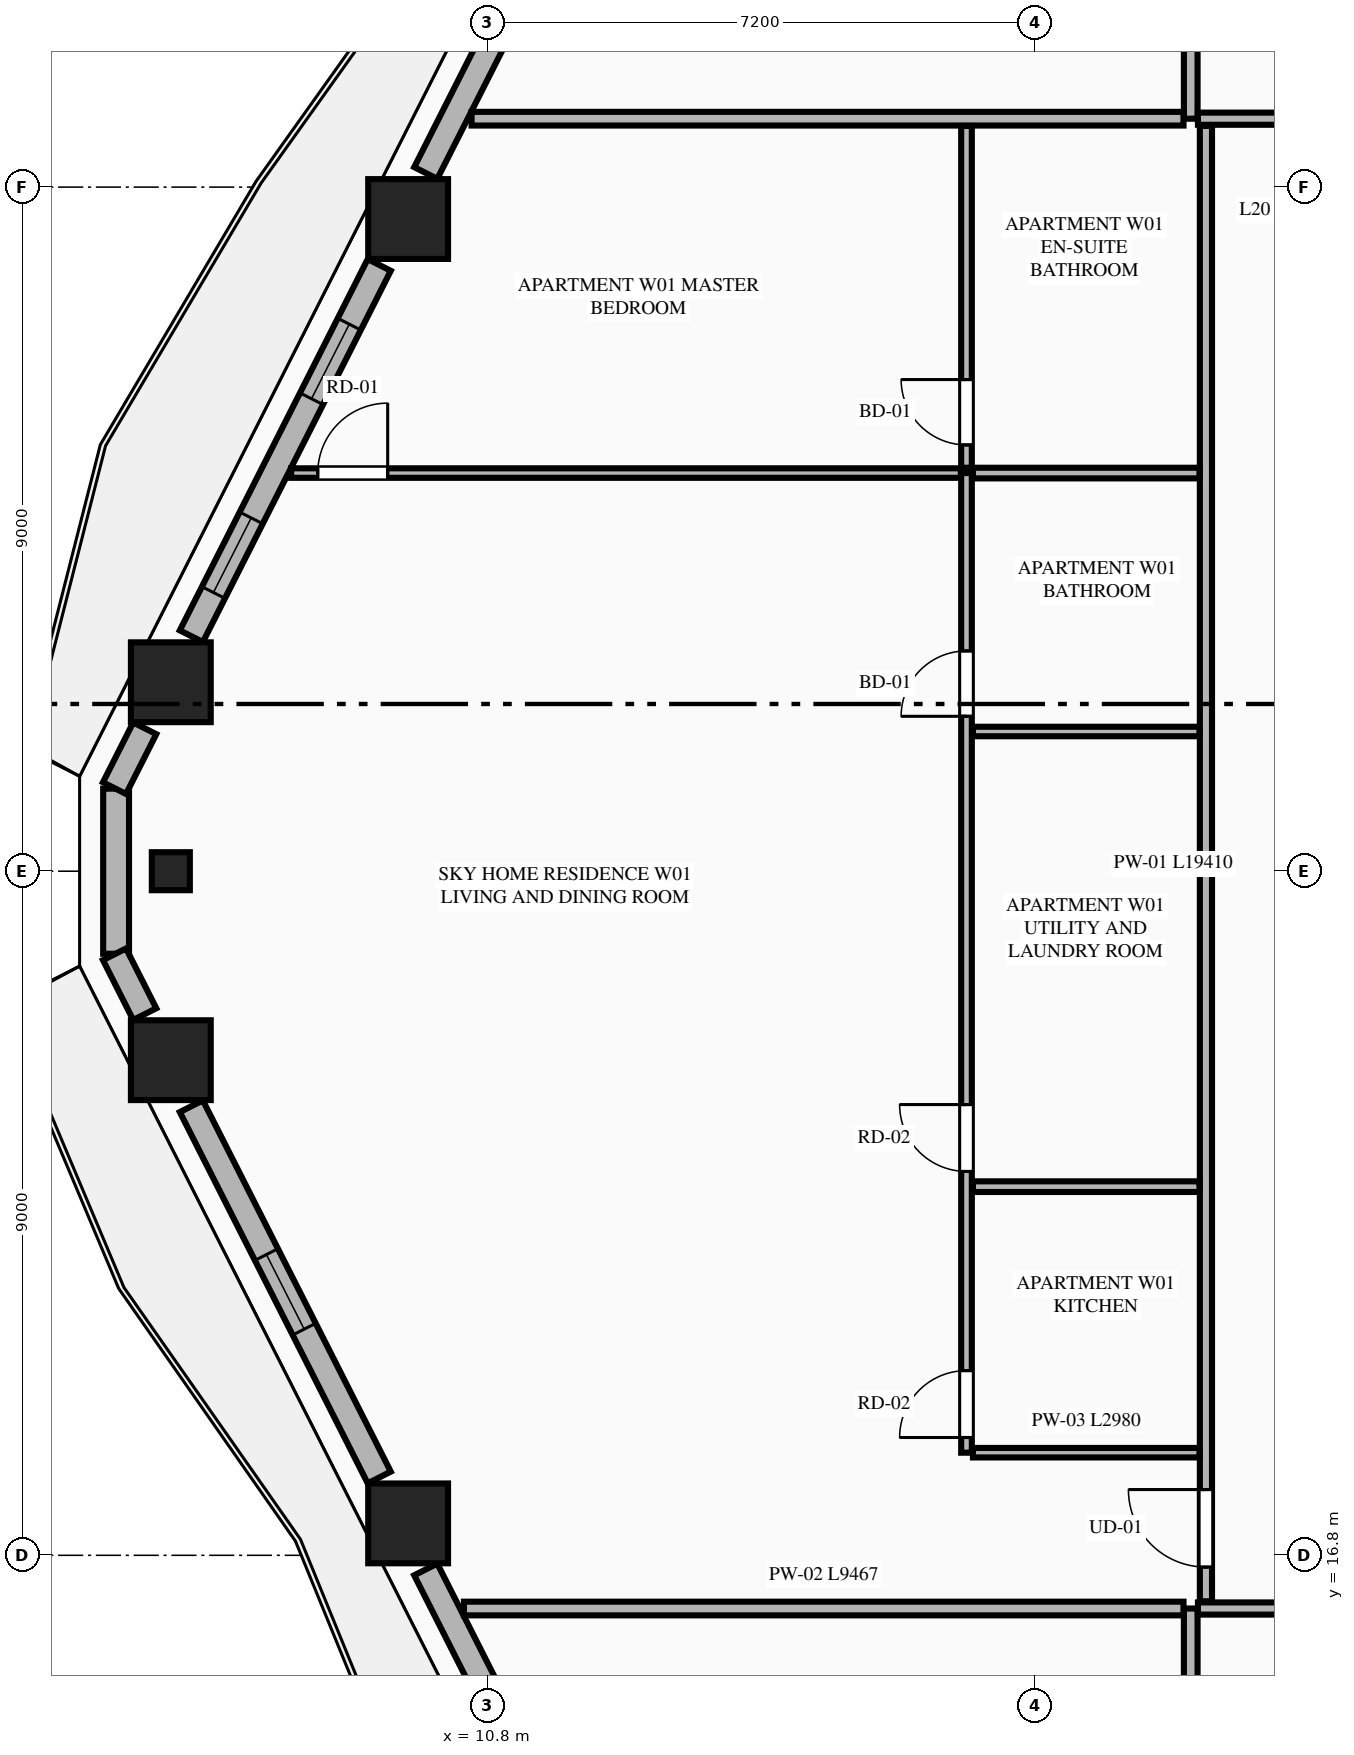
"""IFC4 building model, lengths in metres.
Left out: names, types, materials, properties, quantities, classifications, styles, units other than length and angle.
Written with IfcOpenShell. Run it as: python <this file> out.ifc"""

import sys

from ifc_helpers import new_model, si_unit, direction, frame, frame_2d, origin, origin_2d, place, context, subcontext, project, spatial, rectangle, extrude, element, fill, save


model = new_model("IFC4")
c1 = context("Model", 3, precision=1e-05, world=origin(), true_north=direction((0.0, 1.0)))
c2 = subcontext(c1, "Body", "Model", "MODEL_VIEW")
j1 = project(units=[si_unit("LENGTHUNIT", "METRE"), si_unit("PLANEANGLEUNIT", "RADIAN")], contexts=[c1])
p1 = place(None, origin())
s1 = spatial("IfcSite", under=j1, at=p1, CompositionType="ELEMENT")
p2 = place(p1, origin())
s2 = spatial("IfcBuilding", under=s1, at=p2, CompositionType="ELEMENT")
p3 = place(p2, frame((0.0, 0.0, 80.0)))
s3 = spatial("IfcBuildingStorey", under=s2, at=p3, CompositionType="ELEMENT", Elevation=80.0)
for number, where, z_axis, x_axis in (
    (1, (9.754, 34.38, 0.0), (0.0, 0.0, 1.0), (1.0, 0.0, 0.0)),
    (2, (6.632, 28.286, 0.0), (0.0, 0.0, 1.0), (1.0, 0.0, 0.0)),
    (3, (6.632, 23.314, 0.0), (0.0, 0.0, 1.0), (1.0, 0.0, 0.0)),
    (4, (9.754, 17.22, 0.0), (0.0, 0.0, 1.0), (1.0, 0.0, 0.0)),
):
    element("IfcColumn", number, at=place(p3, frame(where, z_axis=z_axis, x_axis=x_axis)), inside=s3, PredefinedType="COLUMN", context=c2, shape_type="SweptSolid", body=[
        extrude(rectangle(XDim=1.05, YDim=1.05, at=origin_2d()), origin(), (0.0, 0.0, 1.0), 3.55),
    ])
p4 = place(p3, frame((6.632, 25.8, 0.0), z_axis=(0.0, 0.0, 1.0), x_axis=(0.0, -1.0, 0.0)))
e5 = element("IfcColumn", 5, at=p4, inside=s3, PredefinedType="PILASTER", context=c2, shape_type="SweptSolid", body=[
    extrude(rectangle(XDim=0.5, YDim=0.35, at=origin_2d()), origin(), (0.0, 0.0, 1.0), 3.55),
])
p5 = place(p3, frame((5.912, 26.886, 0.0), z_axis=(0.0, 0.0, 1.0), x_axis=(0.0, -1.0, 0.0)))
e6 = element("IfcWall", 6, at=p5, inside=s3, PredefinedType="STANDARD", context=c2, shape_type="SweptSolid", body=[
    extrude(rectangle(XDim=2.172, YDim=0.34, at=frame_2d((1.086, 0.0))), origin(), (0.0, 0.0, 1.0), 3.33),
])
p6 = place(p3, frame((12.567, 40.085, 0.0), z_axis=(0.0, 0.0, 1.0), x_axis=(-0.451599886425, -0.892220568347, 0.0)))
e7 = element("IfcWall", 7, at=p6, inside=s3, PredefinedType="STANDARD", context=c2, shape_type="SweptSolid", body=[
    extrude(rectangle(XDim=5.715, YDim=0.34, at=frame_2d((2.857, 0.0))), origin(), (0.0, 0.0, 1.0), 2.787),
])
p7 = place(p6, frame((1.782, 0.0, 0.0)))
e8 = element("IfcOpeningElement", 8, at=p7, cuts=e7, PredefinedType="OPENING", context=c2, shape_type="SweptSolid", body=[
    extrude(rectangle(XDim=1.1, YDim=2.25, at=frame_2d((0.55, 1.125))), frame((0.0, 0.18, 0.0), z_axis=(0.0, -1.0, 0.0), x_axis=(1.0, 0.0, 0.0)), (0.0, 0.0, 1.0), 0.36),
])
p8 = place(p3, frame((9.374, 33.776, 0.0), z_axis=(0.0, 0.0, 1.0), x_axis=(-0.451597066012, -0.892221995901, 0.0)))
e9 = element("IfcWall", 9, at=p8, inside=s3, PredefinedType="STANDARD", context=c2, shape_type="SweptSolid", body=[
    extrude(rectangle(XDim=5.474, YDim=0.34, at=frame_2d((2.737, 0.0))), origin(), (0.0, 0.0, 1.0), 2.787),
])
p9 = place(p8, frame((0.873, 0.0, 0.75)))
e10 = element("IfcOpeningElement", 10, at=p9, cuts=e9, PredefinedType="OPENING", context=c2, shape_type="SweptSolid", body=[
    extrude(rectangle(XDim=1.1, YDim=1.887, at=frame_2d((0.55, 0.943))), frame((0.0, 0.18, 0.0), z_axis=(0.0, -1.0, 0.0), x_axis=(1.0, 0.0, 0.0)), (0.0, 0.0, 1.0), 0.36),
])
p10 = place(p8, frame((3.73, 0.0, 0.75)))
e11 = element("IfcOpeningElement", 11, at=p10, cuts=e9, PredefinedType="OPENING", context=c2, shape_type="SweptSolid", body=[
    extrude(rectangle(XDim=1.1, YDim=1.887, at=frame_2d((0.55, 0.943))), frame((0.0, 0.18, 0.0), z_axis=(0.0, -1.0, 0.0), x_axis=(1.0, 0.0, 0.0)), (0.0, 0.0, 1.0), 0.36),
])
p11 = place(p3, frame((6.289, 27.68, 0.0), z_axis=(0.0, 0.0, 1.0), x_axis=(-0.451306655769, -0.892368927327, 0.0)))
e12 = element("IfcWall", 12, at=p11, inside=s3, PredefinedType="STANDARD", context=c2, shape_type="SweptSolid", body=[
    extrude(rectangle(XDim=0.882, YDim=0.34, at=frame_2d((0.441, 0.0))), origin(), (0.0, 0.0, 1.0), 3.33),
])
p12 = place(p3, frame((5.891, 24.707, 0.0), z_axis=(0.0, 0.0, 1.0), x_axis=(0.451195173259, -0.892425299747, 0.0)))
e13 = element("IfcWall", 13, at=p12, inside=s3, PredefinedType="STANDARD", context=c2, shape_type="SweptSolid", body=[
    extrude(rectangle(XDim=0.882, YDim=0.34, at=frame_2d((0.441, 0.0))), origin(), (0.0, 0.0, 1.0), 3.33),
])
p13 = place(p3, frame((6.902, 22.708, 0.0), z_axis=(0.0, 0.0, 1.0), x_axis=(0.451579095309, -0.892231091523, 0.0)))
e14 = element("IfcWall", 14, at=p13, inside=s3, PredefinedType="STANDARD", context=c2, shape_type="SweptSolid", body=[
    extrude(rectangle(XDim=5.474, YDim=0.34, at=frame_2d((2.737, 0.0))), origin(), (0.0, 0.0, 1.0), 2.787),
])
p14 = place(p13, frame((2.187, 0.0, 0.75)))
e15 = element("IfcOpeningElement", 15, at=p14, cuts=e14, PredefinedType="OPENING", context=c2, shape_type="SweptSolid", body=[
    extrude(rectangle(XDim=1.1, YDim=1.887, at=frame_2d((0.55, 0.943))), frame((0.0, 0.18, 0.0), z_axis=(0.0, -1.0, 0.0), x_axis=(1.0, 0.0, 0.0)), (0.0, 0.0, 1.0), 0.36),
])
p15 = place(p3, frame((9.986, 16.614, 0.0), z_axis=(0.0, 0.0, 1.0), x_axis=(0.45158267371, -0.892229280401, 0.0)))
e16 = element("IfcWall", 16, at=p15, inside=s3, PredefinedType="STANDARD", context=c2, shape_type="SweptSolid", body=[
    extrude(rectangle(XDim=5.715, YDim=0.34, at=frame_2d((2.857, 0.0))), origin(), (0.0, 0.0, 1.0), 2.787),
])
p16 = place(p15, frame((2.721, 0.0, 0.0)))
e17 = element("IfcOpeningElement", 17, at=p16, cuts=e16, PredefinedType="OPENING", context=c2, shape_type="SweptSolid", body=[
    extrude(rectangle(XDim=1.1, YDim=2.25, at=frame_2d((0.55, 1.125))), frame((0.0, 0.18, 0.0), z_axis=(0.0, -1.0, 0.0), x_axis=(1.0, 0.0, 0.0)), (0.0, 0.0, 1.0), 0.36),
])
p17 = place(p3, frame((20.05, 2.455, 0.0), z_axis=(0.0, 0.0, 1.0), x_axis=(0.0, 1.0, 0.0)))
e18 = element("IfcWall", 18, at=p17, inside=s3, PredefinedType="PARTITIONING", context=c2, shape_type="SweptSolid", body=[
    extrude(rectangle(XDim=13.645, YDim=0.18, at=frame_2d((6.823, 0.0))), origin(), (0.0, 0.0, 1.0), 3.33),
])
p18 = place(p3, frame((20.145, 16.1, 0.0), z_axis=(0.0, 0.0, 1.0), x_axis=(1.0, 0.0, 0.0)))
e19 = element("IfcWall", 19, at=p18, inside=s3, PredefinedType="PARTITIONING", context=c2, shape_type="SweptSolid", body=[
    extrude(rectangle(XDim=24.51, YDim=0.16, at=frame_2d((12.255, 0.0))), origin(), (0.0, 0.0, 1.0), 3.33),
])
p19 = place(p18, frame((22.305, 0.0, 0.0)))
e20 = element("IfcOpeningElement", 20, at=p19, cuts=e19, PredefinedType="OPENING", context=c2, shape_type="SweptSolid", body=[
    extrude(rectangle(XDim=1.02, YDim=2.25, at=frame_2d((0.51, 1.125))), frame((0.0, 0.09, 0.0), z_axis=(0.0, -1.0, 0.0), x_axis=(1.0, 0.0, 0.0)), (0.0, 0.0, 1.0), 0.18),
])
p20 = place(p3, frame((20.05, 35.7, 0.0), z_axis=(0.0, 0.0, 1.0), x_axis=(0.0, 1.0, 0.0)))
e21 = element("IfcWall", 21, at=p20, inside=s3, PredefinedType="PARTITIONING", context=c2, shape_type="SweptSolid", body=[
    extrude(rectangle(XDim=13.445, YDim=0.18, at=frame_2d((6.723, 0.0))), origin(), (0.0, 0.0, 1.0), 3.33),
])
p21 = place(p3, frame((20.145, 35.7, 0.0), z_axis=(0.0, 0.0, 1.0), x_axis=(1.0, 0.0, 0.0)))
e22 = element("IfcWall", 22, at=p21, inside=s3, PredefinedType="PARTITIONING", context=c2, shape_type="SweptSolid", body=[
    extrude(rectangle(XDim=24.51, YDim=0.16, at=frame_2d((12.255, 0.0))), origin(), (0.0, 0.0, 1.0), 3.33),
])
p22 = place(p21, frame((22.305, 0.0, 0.0)))
e23 = element("IfcOpeningElement", 23, at=p22, cuts=e22, PredefinedType="OPENING", context=c2, shape_type="SweptSolid", body=[
    extrude(rectangle(XDim=1.02, YDim=2.25, at=frame_2d((0.51, 1.125))), frame((0.0, 0.09, 0.0), z_axis=(0.0, -1.0, 0.0), x_axis=(1.0, 0.0, 0.0)), (0.0, 0.0, 1.0), 0.18),
])
p23 = place(p3, frame((10.488, 16.1, 0.0), z_axis=(0.0, 0.0, 1.0), x_axis=(1.0, 0.0, 0.0)))
e24 = element("IfcWall", 24, at=p23, inside=s3, PredefinedType="PARTITIONING", context=c2, shape_type="SweptSolid", body=[
    extrude(rectangle(XDim=9.467, YDim=0.18, at=frame_2d((4.733, 0.0))), origin(), (0.0, 0.0, 1.0), 3.33),
])
p24 = place(p3, frame((10.589, 35.7, 0.0), z_axis=(0.0, 0.0, 1.0), x_axis=(1.0, 0.0, 0.0)))
e25 = element("IfcWall", 25, at=p24, inside=s3, PredefinedType="PARTITIONING", context=c2, shape_type="SweptSolid", body=[
    extrude(rectangle(XDim=9.366, YDim=0.18, at=frame_2d((4.683, 0.0))), origin(), (0.0, 0.0, 1.0), 3.33),
])
p25 = place(p3, frame((20.25, 16.195, 0.0), z_axis=(0.0, 0.0, 1.0), x_axis=(0.0, 1.0, 0.0)))
e26 = element("IfcWall", 26, at=p25, inside=s3, PredefinedType="PARTITIONING", context=c2, shape_type="SweptSolid", body=[
    extrude(rectangle(XDim=19.41, YDim=0.16, at=frame_2d((9.705, 0.0))), origin(), (0.0, 0.0, 1.0), 2.7),
])
p26 = place(p25, frame((0.45, 0.0, 0.0)))
e27 = element("IfcOpeningElement", 27, at=p26, cuts=e26, PredefinedType="OPENING", context=c2, shape_type="SweptSolid", body=[
    extrude(rectangle(XDim=1.02, YDim=2.25, at=frame_2d((0.51, 1.125))), frame((0.0, 0.09, 0.0), z_axis=(0.0, -1.0, 0.0), x_axis=(1.0, 0.0, 0.0)), (0.0, 0.0, 1.0), 0.18),
])
p27 = place(p3, frame((17.185, 18.15, 0.0), z_axis=(0.0, 0.0, 1.0), x_axis=(1.0, 0.0, 0.0)))
e28 = element("IfcWall", 28, at=p27, inside=s3, PredefinedType="PARTITIONING", context=c2, shape_type="SweptSolid", body=[
    extrude(rectangle(XDim=2.98, YDim=0.125, at=frame_2d((1.49, 0.0))), origin(), (0.0, 0.0, 1.0), 2.7),
])
p28 = place(p3, frame((17.1, 18.15, 0.0), z_axis=(0.0, 0.0, 1.0), x_axis=(0.0, 1.0, 0.0)))
e29 = element("IfcWall", 29, at=p28, inside=s3, PredefinedType="PLUMBINGWALL", context=c2, shape_type="SweptSolid", body=[
    extrude(rectangle(XDim=12.888, YDim=0.14, at=frame_2d((6.444, 0.0))), origin(), (0.0, 0.0, 1.0), 3.33),
])
p29 = place(p28, frame((0.2, 0.0, 0.0)))
e30 = element("IfcOpeningElement", 30, at=p29, cuts=e29, PredefinedType="OPENING", context=c2, shape_type="SweptSolid", body=[
    extrude(rectangle(XDim=0.88, YDim=2.15, at=frame_2d((0.44, 1.075))), frame((0.0, 0.08, 0.0), z_axis=(0.0, -1.0, 0.0), x_axis=(1.0, 0.0, 0.0)), (0.0, 0.0, 1.0), 0.16),
])
p30 = place(p28, frame((3.7, 0.0, 0.0)))
e31 = element("IfcOpeningElement", 31, at=p30, cuts=e29, PredefinedType="OPENING", context=c2, shape_type="SweptSolid", body=[
    extrude(rectangle(XDim=0.88, YDim=2.15, at=frame_2d((0.44, 1.075))), frame((0.0, 0.08, 0.0), z_axis=(0.0, -1.0, 0.0), x_axis=(1.0, 0.0, 0.0)), (0.0, 0.0, 1.0), 0.16),
])
p31 = place(p28, frame((9.688, 0.0, 0.0)))
e32 = element("IfcOpeningElement", 32, at=p31, cuts=e29, PredefinedType="OPENING", context=c2, shape_type="SweptSolid", body=[
    extrude(rectangle(XDim=0.86, YDim=2.1, at=frame_2d((0.43, 1.05))), frame((0.0, 0.08, 0.0), z_axis=(0.0, -1.0, 0.0), x_axis=(1.0, 0.0, 0.0)), (0.0, 0.0, 1.0), 0.16),
])
p32 = place(p3, frame((17.1, 31.108, 0.0), z_axis=(0.0, 0.0, 1.0), x_axis=(0.0, 1.0, 0.0)))
e33 = element("IfcWall", 33, at=p32, inside=s3, PredefinedType="PLUMBINGWALL", context=c2, shape_type="SweptSolid", body=[
    extrude(rectangle(XDim=4.497, YDim=0.14, at=frame_2d((2.249, 0.0))), origin(), (0.0, 0.0, 1.0), 3.33),
])
p33 = place(p32, frame((0.3, 0.0, 0.0)))
e34 = element("IfcOpeningElement", 34, at=p33, cuts=e33, PredefinedType="OPENING", context=c2, shape_type="SweptSolid", body=[
    extrude(rectangle(XDim=0.86, YDim=2.1, at=frame_2d((0.43, 1.05))), frame((0.0, 0.08, 0.0), z_axis=(0.0, -1.0, 0.0), x_axis=(1.0, 0.0, 0.0)), (0.0, 0.0, 1.0), 0.16),
])
p34 = place(p3, frame((17.185, 31.038, 0.0), z_axis=(0.0, 0.0, 1.0), x_axis=(1.0, 0.0, 0.0)))
e35 = element("IfcWall", 35, at=p34, inside=s3, PredefinedType="PLUMBINGWALL", context=c2, shape_type="SweptSolid", body=[
    extrude(rectangle(XDim=2.98, YDim=0.14, at=frame_2d((1.49, 0.0))), origin(), (0.0, 0.0, 1.0), 3.33),
])
p35 = place(p3, frame((8.215, 31.038, 0.0), z_axis=(0.0, 0.0, 1.0), x_axis=(1.0, 0.0, 0.0)))
e36 = element("IfcWall", 36, at=p35, inside=s3, PredefinedType="PARTITIONING", context=c2, shape_type="SweptSolid", body=[
    extrude(rectangle(XDim=8.81, YDim=0.125, at=frame_2d((4.405, 0.0))), origin(), (0.0, 0.0, 1.0), 3.33),
])
p36 = place(p35, frame((0.35, 0.0, 0.0)))
e37 = element("IfcOpeningElement", 37, at=p36, cuts=e36, PredefinedType="OPENING", context=c2, shape_type="SweptSolid", body=[
    extrude(rectangle(XDim=0.92, YDim=2.15, at=frame_2d((0.46, 1.075))), frame((0.0, 0.073, 0.0), z_axis=(0.0, -1.0, 0.0), x_axis=(1.0, 0.0, 0.0)), (0.0, 0.0, 1.0), 0.145),
])
p37 = place(p3, frame((17.185, 21.65, 0.0), z_axis=(0.0, 0.0, 1.0), x_axis=(1.0, 0.0, 0.0)))
e38 = element("IfcWall", 38, at=p37, inside=s3, PredefinedType="PLUMBINGWALL", context=c2, shape_type="SweptSolid", body=[
    extrude(rectangle(XDim=2.98, YDim=0.14, at=frame_2d((1.49, 0.0))), origin(), (0.0, 0.0, 1.0), 3.33),
])
p38 = place(p3, frame((17.185, 27.638, 0.0), z_axis=(0.0, 0.0, 1.0), x_axis=(1.0, 0.0, 0.0)))
e39 = element("IfcWall", 39, at=p38, inside=s3, PredefinedType="PARTITIONING", context=c2, shape_type="SweptSolid", body=[
    extrude(rectangle(XDim=2.98, YDim=0.125, at=frame_2d((1.49, 0.0))), origin(), (0.0, 0.0, 1.0), 3.33),
])
p39 = place(p9, origin())
e40 = element("IfcWindow", 40, at=p39, inside=s3, PartitioningType="SINGLE_PANEL", PredefinedType="WINDOW", context=c2, shape_type="SweptSolid", body=[
    extrude(rectangle(XDim=1.1, YDim=1.887, at=frame_2d((0.55, 0.943))), frame((0.0, 0.03, 0.0), z_axis=(0.0, -1.0, 0.0), x_axis=(1.0, 0.0, 0.0)), (0.0, 0.0, 1.0), 0.06),
])
fill(e10, e40)
p40 = place(p14, origin())
e41 = element("IfcWindow", 41, at=p40, inside=s3, PartitioningType="SINGLE_PANEL", PredefinedType="WINDOW", context=c2, shape_type="SweptSolid", body=[
    extrude(rectangle(XDim=1.1, YDim=1.887, at=frame_2d((0.55, 0.943))), frame((0.0, 0.03, 0.0), z_axis=(0.0, -1.0, 0.0), x_axis=(1.0, 0.0, 0.0)), (0.0, 0.0, 1.0), 0.06),
])
fill(e15, e41)
p41 = place(p29, origin())
e42 = element("IfcDoor", 42, at=p41, inside=s3, OperationType="SINGLE_SWING_LEFT", PredefinedType="DOOR", context=c2, shape_type="SweptSolid", body=[
    extrude(rectangle(XDim=0.88, YDim=2.15, at=frame_2d((0.44, 1.075))), frame((0.0, 0.025, 0.0), z_axis=(0.0, -1.0, 0.0), x_axis=(1.0, 0.0, 0.0)), (0.0, 0.0, 1.0), 0.05),
])
fill(e30, e42)
p42 = place(p30, origin())
e43 = element("IfcDoor", 43, at=p42, inside=s3, OperationType="SINGLE_SWING_RIGHT", PredefinedType="DOOR", context=c2, shape_type="SweptSolid", body=[
    extrude(rectangle(XDim=0.88, YDim=2.15, at=frame_2d((0.44, 1.075))), frame((0.0, 0.025, 0.0), z_axis=(0.0, -1.0, 0.0), x_axis=(1.0, 0.0, 0.0)), (0.0, 0.0, 1.0), 0.05),
])
fill(e31, e43)
p43 = place(p31, origin())
e44 = element("IfcDoor", 44, at=p43, inside=s3, OperationType="SINGLE_SWING_LEFT", PredefinedType="DOOR", context=c2, shape_type="SweptSolid", body=[
    extrude(rectangle(XDim=0.86, YDim=2.1, at=frame_2d((0.43, 1.05))), frame((0.0, 0.025, 0.0), z_axis=(0.0, -1.0, 0.0), x_axis=(1.0, 0.0, 0.0)), (0.0, 0.0, 1.0), 0.05),
])
fill(e32, e44)
p44 = place(p33, origin())
e45 = element("IfcDoor", 45, at=p44, inside=s3, OperationType="SINGLE_SWING_RIGHT", PredefinedType="DOOR", context=c2, shape_type="SweptSolid", body=[
    extrude(rectangle(XDim=0.86, YDim=2.1, at=frame_2d((0.43, 1.05))), frame((0.0, 0.025, 0.0), z_axis=(0.0, -1.0, 0.0), x_axis=(1.0, 0.0, 0.0)), (0.0, 0.0, 1.0), 0.05),
])
fill(e34, e45)
p45 = place(p26, origin())
e46 = element("IfcDoor", 46, at=p45, inside=s3, OperationType="SINGLE_SWING_RIGHT", PredefinedType="DOOR", context=c2, shape_type="SweptSolid", body=[
    extrude(rectangle(XDim=1.02, YDim=2.25, at=frame_2d((0.51, 1.125))), frame((0.0, 0.025, 0.0), z_axis=(0.0, -1.0, 0.0), x_axis=(1.0, 0.0, 0.0)), (0.0, 0.0, 1.0), 0.05),
])
fill(e27, e46)
p46 = place(p36, origin())
e47 = element("IfcDoor", 47, at=p46, inside=s3, OperationType="SINGLE_SWING_RIGHT", PredefinedType="DOOR", context=c2, shape_type="SweptSolid", body=[
    extrude(rectangle(XDim=0.92, YDim=2.15, at=frame_2d((0.46, 1.075))), frame((0.0, 0.025, 0.0), z_axis=(0.0, -1.0, 0.0), x_axis=(1.0, 0.0, 0.0)), (0.0, 0.0, 1.0), 0.05),
])
fill(e37, e47)
p47 = place(p10, origin())
e48 = element("IfcWindow", 48, at=p47, inside=s3, PartitioningType="SINGLE_PANEL", PredefinedType="WINDOW", context=c2, shape_type="SweptSolid", body=[
    extrude(rectangle(XDim=1.1, YDim=1.887, at=frame_2d((0.55, 0.943))), frame((0.0, 0.03, 0.0), z_axis=(0.0, -1.0, 0.0), x_axis=(1.0, 0.0, 0.0)), (0.0, 0.0, 1.0), 0.06),
])
fill(e11, e48)
save(model, sys.argv[1])
